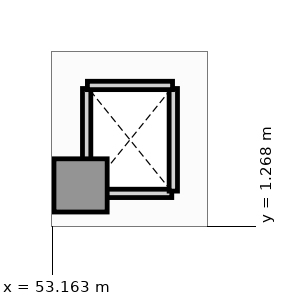
"""IFC4 building model, lengths in metres.
Left out: names, types, materials, properties, quantities, classifications, styles, units other than length and angle.
Written with IfcOpenShell. Run it as: python <this file> out.ifc"""

import sys

from ifc_helpers import new_model, si_unit, direction, frame, frame_2d, origin, origin_2d, place, context, subcontext, project, spatial, rectangle, hollow_rectangle, extrude, element, save


model = new_model("IFC4")
c1 = context("Model", 3, precision=1e-05, world=origin(), true_north=direction((0.0, 1.0)))
c2 = subcontext(c1, "Body", "Model", "MODEL_VIEW")
j1 = project(units=[si_unit("LENGTHUNIT", "METRE"), si_unit("PLANEANGLEUNIT", "RADIAN")], contexts=[c1])
p1 = place(None, origin())
s1 = spatial("IfcSite", under=j1, at=p1, CompositionType="ELEMENT")
p2 = place(p1, origin())
s2 = spatial("IfcBuilding", under=s1, at=p2, CompositionType="ELEMENT")
p3 = place(p2, frame((0.0, 0.0, 24.6)))
s3 = spatial("IfcBuildingStorey", under=s2, at=p3, CompositionType="ELEMENT", Elevation=24.6)
p4 = place(p3, frame((53.9, 2.35, 0.0), z_axis=(0.0, 0.0, 1.0), x_axis=(1.0, 0.0, 0.0)))
e1 = element("IfcColumn", 1, at=p4, inside=s3, PredefinedType="USERDEFINED", context=c2, shape_type="SweptSolid", body=[
    extrude(hollow_rectangle(XDim=1.4, YDim=1.4, WallThickness=0.08, at=origin_2d()), origin(), (0.0, 0.0, 1.0), 5.2),
])
p5 = place(p3, frame((54.1, 2.14, 0.0), z_axis=(0.0, 0.0, 1.0), x_axis=(1.0, 0.0, 0.0)))
e2 = element("IfcWall", 2, at=p5, inside=s3, PredefinedType="SOLIDWALL", context=c2, shape_type="SweptSolid", body=[
    extrude(rectangle(XDim=2.2, YDim=0.22, at=frame_2d((1.1, 0.0))), origin(), (0.0, 0.0, 1.0), 3.95),
])
p6 = place(p3, frame((54.06, 2.2, 0.0), z_axis=(0.0, 0.0, 1.0), x_axis=(0.0, 1.0, 0.0)))
e3 = element("IfcWall", 3, at=p6, inside=s3, PredefinedType="SOLIDWALL", context=c2, shape_type="SweptSolid", body=[
    extrude(rectangle(XDim=2.7, YDim=0.22, at=frame_2d((1.35, 0.0))), origin(), (0.0, 0.0, 1.0), 4.417),
])
p7 = place(p3, frame((56.34, 2.2, 0.0), z_axis=(0.0, 0.0, 1.0), x_axis=(0.0, 1.0, 0.0)))
e4 = element("IfcWall", 4, at=p7, inside=s3, PredefinedType="SOLIDWALL", context=c2, shape_type="SweptSolid", body=[
    extrude(rectangle(XDim=2.7, YDim=0.22, at=frame_2d((1.35, 0.0))), origin(), (0.0, 0.0, 1.0), 4.95),
])
p8 = place(p3, frame((54.08, 4.98, 0.0), z_axis=(0.0, 0.0, 1.0), x_axis=(1.0, 0.0, 0.0)))
e5 = element("IfcWall", 5, at=p8, inside=s3, PredefinedType="SOLIDWALL", context=c2, shape_type="SweptSolid", body=[
    extrude(rectangle(XDim=2.24, YDim=0.22, at=frame_2d((1.12, 0.0))), origin(), (0.0, 0.0, 1.0), 4.95),
])
save(model, sys.argv[1])
